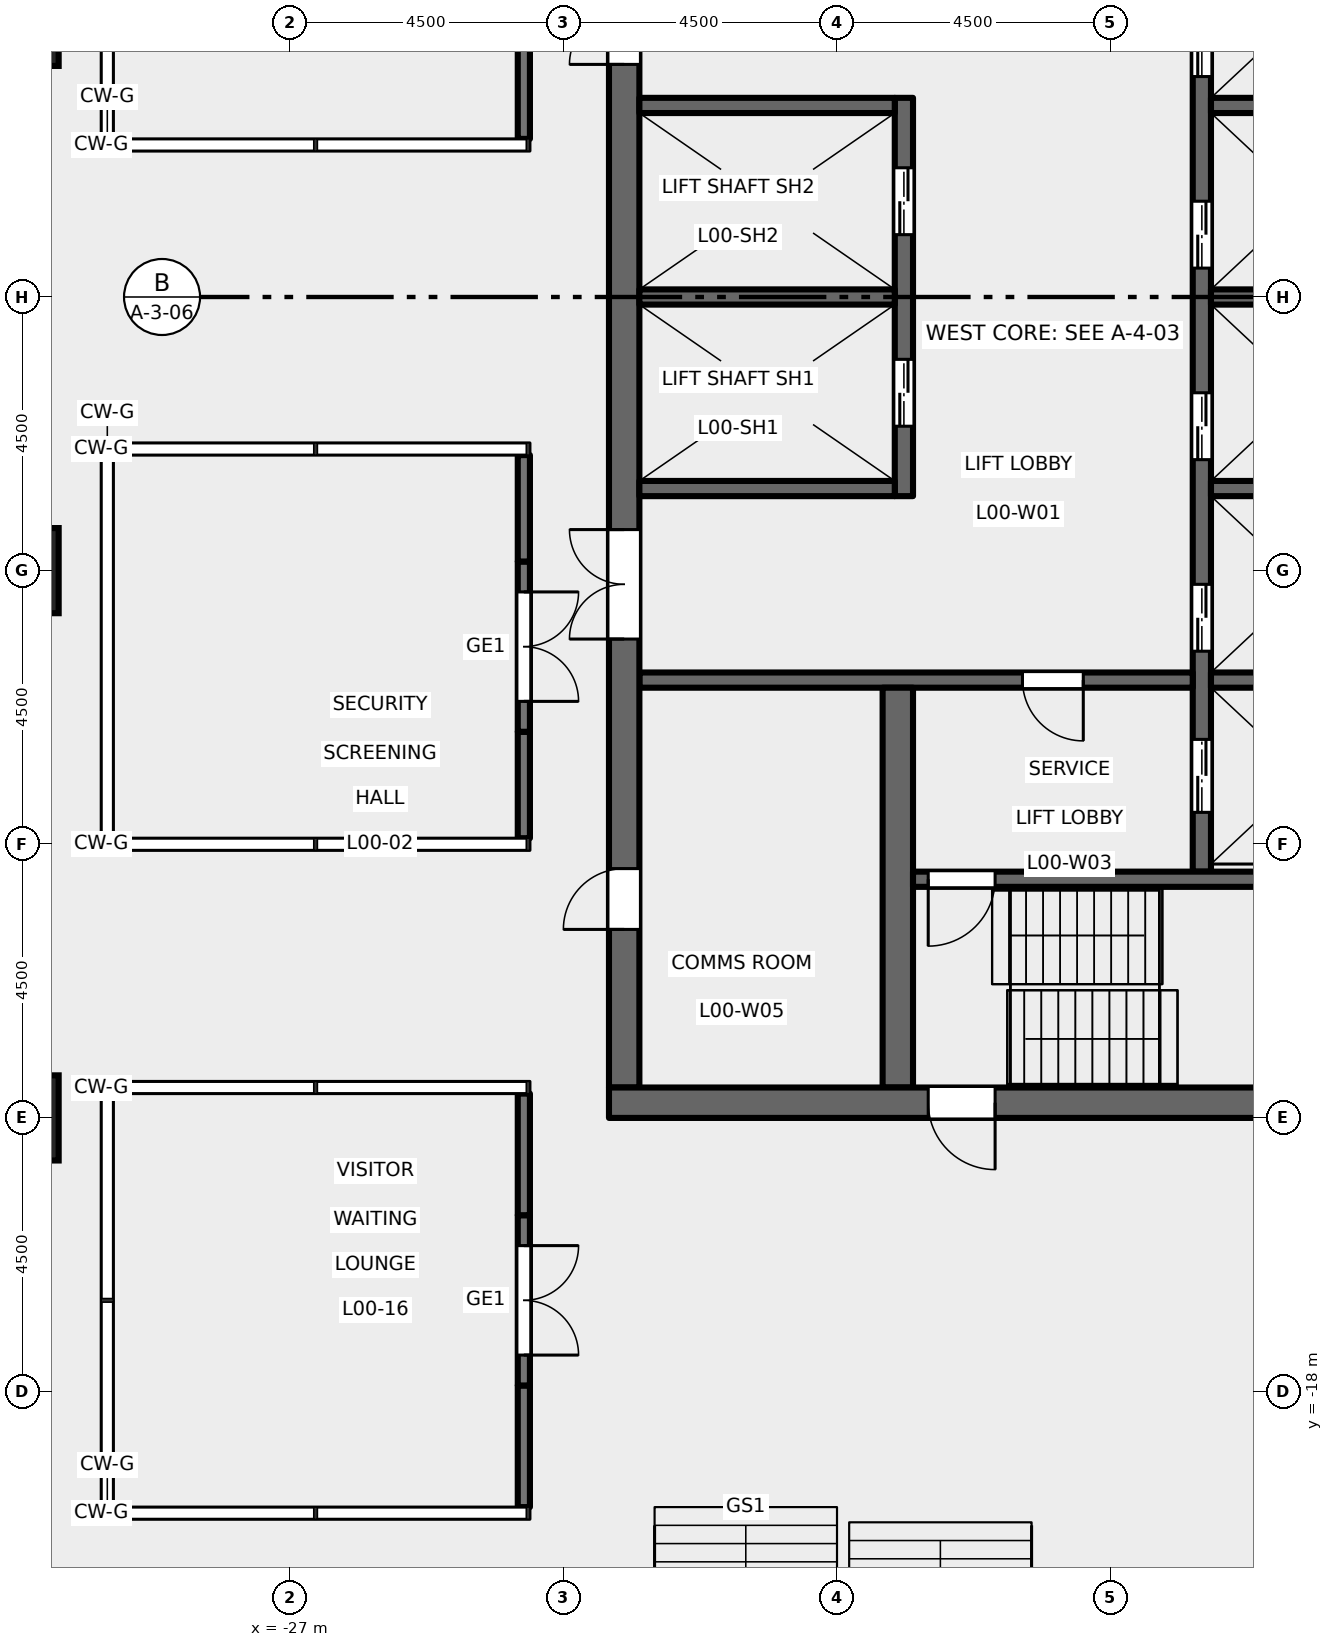
"""IFC4 building model, lengths in metres.
Left out: names, types, materials, properties, quantities, classifications, styles, units other than length and angle.
Written with IfcOpenShell. Run it as: python <this file> out.ifc"""

import sys

from ifc_helpers import new_model, si_unit, direction, frame, frame_2d, origin, origin_2d, place, context, subcontext, project, spatial, rectangle, hollow_rectangle, extrude, element, fill, save


model = new_model("IFC4")
c1 = context("Model", 3, precision=1e-05, world=origin(), true_north=direction((0.0, 1.0)))
c2 = subcontext(c1, "Body", "Model", "MODEL_VIEW")
j1 = project(units=[si_unit("LENGTHUNIT", "METRE"), si_unit("PLANEANGLEUNIT", "RADIAN")], contexts=[c1])
p1 = place(None, origin())
s1 = spatial("IfcSite", under=j1, at=p1, CompositionType="ELEMENT")
p2 = place(p1, origin())
s2 = spatial("IfcBuilding", under=s1, at=p2, CompositionType="ELEMENT")
p3 = place(p2, origin())
s3 = spatial("IfcBuildingStorey", under=s2, at=p3, CompositionType="ELEMENT", Elevation=0.0)
for number, where, z_axis, x_axis in (
    (1, (-31.5, 4.5, 0.0), (0.0, 0.0, 1.0), (1.0, 0.0, 0.0)),
    (2, (-31.5, -4.5, 0.0), (0.0, 0.0, 1.0), (1.0, 0.0, 0.0)),
    (3, (-31.5, -13.5, 0.0), (0.0, 0.0, 1.0), (1.0, 0.0, 0.0)),
):
    element("IfcColumn", number, at=place(p3, frame(where, z_axis=z_axis, x_axis=x_axis)), inside=s3, PredefinedType="COLUMN", context=c2, shape_type="SweptSolid", body=[
        extrude(hollow_rectangle(XDim=1.4, YDim=1.4, WallThickness=0.07, at=origin_2d()), origin(), (0.0, 0.0, 1.0), 7.2),
    ])
p4 = place(p3, frame((-12.0, -9.45, 0.0), z_axis=(0.0, 0.0, 1.0), x_axis=(0.0, 1.0, 0.0)))
e4 = element("IfcWall", 4, at=p4, inside=s3, PredefinedType="SHEAR", context=c2, shape_type="SweptSolid", body=[
    extrude(rectangle(XDim=18.9, YDim=0.3, at=frame_2d((9.45, 0.0))), origin(), (0.0, 0.0, 1.0), 7.0),
])
p5 = place(p4, frame((3.625, 0.0, 0.0)))
e5 = element("IfcOpeningElement", 5, at=p5, cuts=e4, PredefinedType="OPENING", context=c2, shape_type="SweptSolid", body=[
    extrude(rectangle(XDim=1.1, YDim=2.1, at=frame_2d((0.55, 1.05))), frame((0.0, 0.16, 0.0), z_axis=(0.0, -1.0, 0.0), x_axis=(1.0, 0.0, 0.0)), (0.0, 0.0, 1.0), 0.32),
])
p6 = place(p4, frame((6.775, 0.0, 0.0)))
e6 = element("IfcOpeningElement", 6, at=p6, cuts=e4, PredefinedType="OPENING", context=c2, shape_type="SweptSolid", body=[
    extrude(rectangle(XDim=1.1, YDim=2.1, at=frame_2d((0.55, 1.05))), frame((0.0, 0.16, 0.0), z_axis=(0.0, -1.0, 0.0), x_axis=(1.0, 0.0, 0.0)), (0.0, 0.0, 1.0), 0.32),
])
p7 = place(p4, frame((9.925, 0.0, 0.0)))
e7 = element("IfcOpeningElement", 7, at=p7, cuts=e4, PredefinedType="OPENING", context=c2, shape_type="SweptSolid", body=[
    extrude(rectangle(XDim=1.1, YDim=2.1, at=frame_2d((0.55, 1.05))), frame((0.0, 0.16, 0.0), z_axis=(0.0, -1.0, 0.0), x_axis=(1.0, 0.0, 0.0)), (0.0, 0.0, 1.0), 0.32),
])
p8 = place(p4, frame((13.075, 0.0, 0.0)))
e8 = element("IfcOpeningElement", 8, at=p8, cuts=e4, PredefinedType="OPENING", context=c2, shape_type="SweptSolid", body=[
    extrude(rectangle(XDim=1.1, YDim=2.1, at=frame_2d((0.55, 1.05))), frame((0.0, 0.16, 0.0), z_axis=(0.0, -1.0, 0.0), x_axis=(1.0, 0.0, 0.0)), (0.0, 0.0, 1.0), 0.32),
])
p9 = place(p4, frame((16.725, 0.0, 0.0)))
e9 = element("IfcOpeningElement", 9, at=p9, cuts=e4, PredefinedType="OPENING", context=c2, shape_type="SweptSolid", body=[
    extrude(rectangle(XDim=1.2, YDim=2.1, at=frame_2d((0.6, 1.05))), frame((0.0, 0.16, 0.0), z_axis=(0.0, -1.0, 0.0), x_axis=(1.0, 0.0, 0.0)), (0.0, 0.0, 1.0), 0.32),
])
p10 = place(p4, frame((0.975, 0.0, 0.0)))
e10 = element("IfcOpeningElement", 10, at=p10, cuts=e4, PredefinedType="OPENING", context=c2, shape_type="SweptSolid", body=[
    extrude(rectangle(XDim=1.2, YDim=2.1, at=frame_2d((0.6, 1.05))), frame((0.0, 0.16, 0.0), z_axis=(0.0, -1.0, 0.0), x_axis=(1.0, 0.0, 0.0)), (0.0, 0.0, 1.0), 0.32),
])
p11 = place(p3, frame((-12.15, -6.3, 0.0), z_axis=(0.0, 0.0, 1.0), x_axis=(-1.0, 0.0, 0.0)))
e11 = element("IfcWall", 11, at=p11, inside=s3, PredefinedType="SHEAR", context=c2, shape_type="SweptSolid", body=[
    extrude(rectangle(XDim=9.1, YDim=0.25, at=frame_2d((4.55, 0.0))), origin(), (0.0, 0.0, 1.0), 7.0),
])
p12 = place(p11, frame((1.8, 0.0, 0.0)))
e12 = element("IfcOpeningElement", 12, at=p12, cuts=e11, PredefinedType="OPENING", context=c2, shape_type="SweptSolid", body=[
    extrude(rectangle(XDim=1.0, YDim=2.1, at=frame_2d((0.5, 1.05))), frame((0.0, 0.135, 0.0), z_axis=(0.0, -1.0, 0.0), x_axis=(1.0, 0.0, 0.0)), (0.0, 0.0, 1.0), 0.27),
])
p13 = place(p3, frame((-21.5, -13.0, 0.0), z_axis=(0.0, 0.0, 1.0), x_axis=(0.0, 1.0, 0.0)))
e13 = element("IfcWall", 13, at=p13, inside=s3, PredefinedType="SHEAR", context=c2, shape_type="SweptSolid", body=[
    extrude(rectangle(XDim=26.0, YDim=0.5, at=frame_2d((13.0, 0.0))), origin(), (0.0, 0.0, 1.0), 7.0),
])
p14 = place(p13, frame((16.825, 0.0, 0.0)))
e14 = element("IfcOpeningElement", 14, at=p14, cuts=e13, PredefinedType="OPENING", context=c2, shape_type="SweptSolid", body=[
    extrude(rectangle(XDim=1.8, YDim=2.1, at=frame_2d((0.9, 1.05))), frame((0.0, 0.26, 0.0), z_axis=(0.0, -1.0, 0.0), x_axis=(1.0, 0.0, 0.0)), (0.0, 0.0, 1.0), 0.52),
])
p15 = place(p13, frame((7.375, 0.0, 0.0)))
e15 = element("IfcOpeningElement", 15, at=p15, cuts=e13, PredefinedType="OPENING", context=c2, shape_type="SweptSolid", body=[
    extrude(rectangle(XDim=1.8, YDim=2.1, at=frame_2d((0.9, 1.05))), frame((0.0, 0.26, 0.0), z_axis=(0.0, -1.0, 0.0), x_axis=(1.0, 0.0, 0.0)), (0.0, 0.0, 1.0), 0.52),
])
p16 = place(p13, frame((2.6, 0.0, 0.0)))
e16 = element("IfcOpeningElement", 16, at=p16, cuts=e13, PredefinedType="OPENING", context=c2, shape_type="SweptSolid", body=[
    extrude(rectangle(XDim=1.0, YDim=2.1, at=frame_2d((0.5, 1.05))), frame((0.0, 0.26, 0.0), z_axis=(0.0, -1.0, 0.0), x_axis=(1.0, 0.0, 0.0)), (0.0, 0.0, 1.0), 0.52),
])
p17 = place(p3, frame((-16.9, -3.275, 0.0), z_axis=(0.0, 0.0, 1.0), x_axis=(0.0, 1.0, 0.0)))
e17 = element("IfcWall", 17, at=p17, inside=s3, PredefinedType="SHEAR", context=c2, shape_type="SweptSolid", body=[
    extrude(rectangle(XDim=6.55, YDim=0.3, at=frame_2d((3.275, 0.0))), origin(), (0.0, 0.0, 1.0), 7.0),
])
p18 = place(p17, frame((1.15, 0.0, 0.0)))
e18 = element("IfcOpeningElement", 18, at=p18, cuts=e17, PredefinedType="OPENING", context=c2, shape_type="SweptSolid", body=[
    extrude(rectangle(XDim=1.1, YDim=2.1, at=frame_2d((0.55, 1.05))), frame((0.0, 0.16, 0.0), z_axis=(0.0, -1.0, 0.0), x_axis=(1.0, 0.0, 0.0)), (0.0, 0.0, 1.0), 0.32),
])
p19 = place(p17, frame((4.3, 0.0, 0.0)))
e19 = element("IfcOpeningElement", 19, at=p19, cuts=e17, PredefinedType="OPENING", context=c2, shape_type="SweptSolid", body=[
    extrude(rectangle(XDim=1.1, YDim=2.1, at=frame_2d((0.55, 1.05))), frame((0.0, 0.16, 0.0), z_axis=(0.0, -1.0, 0.0), x_axis=(1.0, 0.0, 0.0)), (0.0, 0.0, 1.0), 0.32),
])
for number, where, z_axis, x_axis in (
    (20, (-17.05, 0.0, 0.0), (0.0, 0.0, 1.0), (-1.0, 0.0, 0.0)),
    (21, (-17.05, 3.15, 0.0), (0.0, 0.0, 1.0), (-1.0, 0.0, 0.0)),
    (22, (-17.05, -3.15, 0.0), (0.0, 0.0, 1.0), (-1.0, 0.0, 0.0)),
):
    element("IfcWall", number, at=place(p3, frame(where, z_axis=z_axis, x_axis=x_axis)), inside=s3, PredefinedType="SHEAR", context=c2, shape_type="SweptSolid", body=[
        extrude(rectangle(XDim=4.2, YDim=0.25, at=frame_2d((2.1, 0.0))), origin(), (0.0, 0.0, 1.0), 7.0),
    ])
p20 = place(p3, frame((-17.0, -13.0, 0.0), z_axis=(0.0, 0.0, 1.0), x_axis=(0.0, 1.0, 0.0)))
e23 = element("IfcWall", 23, at=p20, inside=s3, PredefinedType="SHEAR", context=c2, shape_type="SweptSolid", body=[
    extrude(rectangle(XDim=6.575, YDim=0.5, at=frame_2d((3.288, 0.0))), origin(), (0.0, 0.0, 1.0), 7.0),
])
for number, where, z_axis, x_axis in (
    (24, (-8.75, 0.0, 0.0), (0.0, 0.0, 1.0), (-1.0, 0.0, 0.0)),
    (25, (-8.75, 3.15, 0.0), (0.0, 0.0, 1.0), (-1.0, 0.0, 0.0)),
    (26, (-8.75, -3.15, 0.0), (0.0, 0.0, 1.0), (-1.0, 0.0, 0.0)),
    (27, (-8.75, -6.3, 0.0), (0.0, 0.0, 1.0), (-1.0, 0.0, 0.0)),
):
    element("IfcWall", number, at=place(p3, frame(where, z_axis=z_axis, x_axis=x_axis)), inside=s3, PredefinedType="SHEAR", context=c2, shape_type="SweptSolid", body=[
        extrude(rectangle(XDim=3.1, YDim=0.25, at=frame_2d((1.55, 0.0))), origin(), (0.0, 0.0, 1.0), 7.0),
    ])
p21 = place(p3, frame((-8.75, -9.575, 0.0), z_axis=(0.0, 0.0, 1.0), x_axis=(-1.0, 0.0, 0.0)))
e28 = element("IfcWall", 28, at=p21, inside=s3, PredefinedType="SHEAR", context=c2, shape_type="SweptSolid", body=[
    extrude(rectangle(XDim=8.0, YDim=0.25, at=frame_2d((4.0, 0.0))), origin(), (0.0, 0.0, 1.0), 7.0),
])
p22 = place(p21, frame((6.65, 0.0, 0.0)))
e29 = element("IfcOpeningElement", 29, at=p22, cuts=e28, PredefinedType="OPENING", context=c2, shape_type="SweptSolid", body=[
    extrude(rectangle(XDim=1.1, YDim=2.1, at=frame_2d((0.55, 1.05))), frame((0.0, 0.135, 0.0), z_axis=(0.0, -1.0, 0.0), x_axis=(1.0, 0.0, 0.0)), (0.0, 0.0, 1.0), 0.27),
])
p23 = place(p3, frame((-8.25, -13.25, 0.0), z_axis=(0.0, 0.0, 1.0), x_axis=(-1.0, 0.0, 0.0)))
e30 = element("IfcWall", 30, at=p23, inside=s3, PredefinedType="SHEAR", context=c2, shape_type="SweptSolid", body=[
    extrude(rectangle(XDim=13.5, YDim=0.5, at=frame_2d((6.75, 0.0))), origin(), (0.0, 0.0, 1.0), 7.0),
])
p24 = place(p23, frame((7.15, 0.0, 0.0)))
e31 = element("IfcOpeningElement", 31, at=p24, cuts=e30, PredefinedType="OPENING", context=c2, shape_type="SweptSolid", body=[
    extrude(rectangle(XDim=1.1, YDim=2.1, at=frame_2d((0.55, 1.05))), frame((0.0, 0.26, 0.0), z_axis=(0.0, -1.0, 0.0), x_axis=(1.0, 0.0, 0.0)), (0.0, 0.0, 1.0), 0.52),
])
p25 = place(p3, frame((-23.15, -8.9, 0.0), z_axis=(0.0, 0.0, 1.0), x_axis=(0.0, 1.0, 0.0)))
e32 = element("IfcWall", 32, at=p25, inside=s3, PredefinedType="SOLIDWALL", context=c2, shape_type="SweptSolid", body=[
    extrude(rectangle(XDim=1.75, YDim=0.2, at=frame_2d((0.875, 0.0))), origin(), (0.0, 0.0, 1.0), 4.3),
])
p26 = place(p3, frame((-23.15, -7.15, 0.0), z_axis=(0.0, 0.0, 1.0), x_axis=(0.0, 1.0, 0.0)))
e33 = element("IfcWall", 33, at=p26, inside=s3, PredefinedType="SOLIDWALL", context=c2, shape_type="SweptSolid", body=[
    extrude(rectangle(XDim=2.8, YDim=0.2, at=frame_2d((1.4, 0.0))), origin(), (0.0, 0.0, 1.0), 4.3),
])
p27 = place(p26, frame((0.5, 0.0, 0.0)))
e34 = element("IfcOpeningElement", 34, at=p27, cuts=e33, PredefinedType="OPENING", context=c2, shape_type="SweptSolid", body=[
    extrude(rectangle(XDim=1.8, YDim=2.4, at=frame_2d((0.9, 1.2))), frame((0.0, 0.11, 0.0), z_axis=(0.0, -1.0, 0.0), x_axis=(1.0, 0.0, 0.0)), (0.0, 0.0, 1.0), 0.22),
])
p28 = place(p3, frame((-23.15, -4.35, 0.0), z_axis=(0.0, 0.0, 1.0), x_axis=(0.0, 1.0, 0.0)))
e35 = element("IfcWall", 35, at=p28, inside=s3, PredefinedType="SOLIDWALL", context=c2, shape_type="SweptSolid", body=[
    extrude(rectangle(XDim=1.75, YDim=0.2, at=frame_2d((0.875, 0.0))), origin(), (0.0, 0.0, 1.0), 4.3),
])
p29 = place(p3, frame((-23.15, 2.6, 0.0), z_axis=(0.0, 0.0, 1.0), x_axis=(0.0, 1.0, 0.0)))
e36 = element("IfcWall", 36, at=p29, inside=s3, PredefinedType="SOLIDWALL", context=c2, shape_type="SweptSolid", body=[
    extrude(rectangle(XDim=2.15, YDim=0.2, at=frame_2d((1.075, 0.0))), origin(), (0.0, 0.0, 1.0), 4.3),
])
p30 = place(p3, frame((-23.15, -19.9, 0.0), z_axis=(0.0, 0.0, 1.0), x_axis=(0.0, 1.0, 0.0)))
e37 = element("IfcWall", 37, at=p30, inside=s3, PredefinedType="SOLIDWALL", context=c2, shape_type="SweptSolid", body=[
    extrude(rectangle(XDim=2.0, YDim=0.2, at=frame_2d((1.0, 0.0))), origin(), (0.0, 0.0, 1.0), 4.3),
])
p31 = place(p3, frame((-23.15, -17.9, 0.0), z_axis=(0.0, 0.0, 1.0), x_axis=(0.0, 1.0, 0.0)))
e38 = element("IfcWall", 38, at=p31, inside=s3, PredefinedType="SOLIDWALL", context=c2, shape_type="SweptSolid", body=[
    extrude(rectangle(XDim=2.8, YDim=0.2, at=frame_2d((1.4, 0.0))), origin(), (0.0, 0.0, 1.0), 4.3),
])
p32 = place(p31, frame((0.5, 0.0, 0.0)))
e39 = element("IfcOpeningElement", 39, at=p32, cuts=e38, PredefinedType="OPENING", context=c2, shape_type="SweptSolid", body=[
    extrude(rectangle(XDim=1.8, YDim=2.4, at=frame_2d((0.9, 1.2))), frame((0.0, 0.11, 0.0), z_axis=(0.0, -1.0, 0.0), x_axis=(1.0, 0.0, 0.0)), (0.0, 0.0, 1.0), 0.22),
])
p33 = place(p3, frame((-23.15, -15.1, 0.0), z_axis=(0.0, 0.0, 1.0), x_axis=(0.0, 1.0, 0.0)))
e40 = element("IfcWall", 40, at=p33, inside=s3, PredefinedType="SOLIDWALL", context=c2, shape_type="SweptSolid", body=[
    extrude(rectangle(XDim=2.0, YDim=0.2, at=frame_2d((1.0, 0.0))), origin(), (0.0, 0.0, 1.0), 4.3),
])
p34 = place(p12, origin())
e41 = element("IfcDoor", 41, at=p34, inside=s3, OperationType="SINGLE_SWING_RIGHT", PredefinedType="DOOR", context=c2, shape_type="SweptSolid", body=[
    extrude(rectangle(XDim=1.0, YDim=2.1, at=frame_2d((0.5, 1.05))), frame((0.0, 0.025, 0.0), z_axis=(0.0, -1.0, 0.0), x_axis=(1.0, 0.0, 0.0)), (0.0, 0.0, 1.0), 0.05),
])
fill(e12, e41)
p35 = place(p22, origin())
e42 = element("IfcDoor", 42, at=p35, inside=s3, OperationType="SINGLE_SWING_LEFT", PredefinedType="DOOR", context=c2, shape_type="SweptSolid", body=[
    extrude(rectangle(XDim=1.1, YDim=2.1, at=frame_2d((0.55, 1.05))), frame((0.0, 0.025, 0.0), z_axis=(0.0, -1.0, 0.0), x_axis=(1.0, 0.0, 0.0)), (0.0, 0.0, 1.0), 0.05),
])
fill(e29, e42)
p36 = place(p14, origin())
e43 = element("IfcDoor", 43, at=p36, inside=s3, OperationType="DOUBLE_DOOR_DOUBLE_SWING", PredefinedType="DOOR", context=c2, shape_type="SweptSolid", body=[
    extrude(rectangle(XDim=1.8, YDim=2.1, at=frame_2d((0.9, 1.05))), frame((0.0, 0.025, 0.0), z_axis=(0.0, -1.0, 0.0), x_axis=(1.0, 0.0, 0.0)), (0.0, 0.0, 1.0), 0.05),
])
fill(e14, e43)
p37 = place(p15, origin())
e44 = element("IfcDoor", 44, at=p37, inside=s3, OperationType="DOUBLE_DOOR_DOUBLE_SWING", PredefinedType="DOOR", context=c2, shape_type="SweptSolid", body=[
    extrude(rectangle(XDim=1.8, YDim=2.1, at=frame_2d((0.9, 1.05))), frame((0.0, 0.025, 0.0), z_axis=(0.0, -1.0, 0.0), x_axis=(1.0, 0.0, 0.0)), (0.0, 0.0, 1.0), 0.05),
])
fill(e15, e44)
p38 = place(p24, origin())
e45 = element("IfcDoor", 45, at=p38, inside=s3, OperationType="SINGLE_SWING_RIGHT", PredefinedType="DOOR", context=c2, shape_type="SweptSolid", body=[
    extrude(rectangle(XDim=1.1, YDim=2.1, at=frame_2d((0.55, 1.05))), frame((0.0, 0.025, 0.0), z_axis=(0.0, -1.0, 0.0), x_axis=(1.0, 0.0, 0.0)), (0.0, 0.0, 1.0), 0.05),
])
fill(e31, e45)
p39 = place(p5, origin())
e46 = element("IfcDoor", 46, at=p39, inside=s3, OperationType="DOUBLE_DOOR_SLIDING", PredefinedType="DOOR", context=c2, shape_type="SweptSolid", body=[
    extrude(rectangle(XDim=1.1, YDim=2.1, at=frame_2d((0.55, 1.05))), frame((0.0, 0.025, 0.0), z_axis=(0.0, -1.0, 0.0), x_axis=(1.0, 0.0, 0.0)), (0.0, 0.0, 1.0), 0.05),
])
fill(e5, e46)
p40 = place(p6, origin())
e47 = element("IfcDoor", 47, at=p40, inside=s3, OperationType="DOUBLE_DOOR_SLIDING", PredefinedType="DOOR", context=c2, shape_type="SweptSolid", body=[
    extrude(rectangle(XDim=1.1, YDim=2.1, at=frame_2d((0.55, 1.05))), frame((0.0, 0.025, 0.0), z_axis=(0.0, -1.0, 0.0), x_axis=(1.0, 0.0, 0.0)), (0.0, 0.0, 1.0), 0.05),
])
fill(e6, e47)
p41 = place(p7, origin())
e48 = element("IfcDoor", 48, at=p41, inside=s3, OperationType="DOUBLE_DOOR_SLIDING", PredefinedType="DOOR", context=c2, shape_type="SweptSolid", body=[
    extrude(rectangle(XDim=1.1, YDim=2.1, at=frame_2d((0.55, 1.05))), frame((0.0, 0.025, 0.0), z_axis=(0.0, -1.0, 0.0), x_axis=(1.0, 0.0, 0.0)), (0.0, 0.0, 1.0), 0.05),
])
fill(e7, e48)
p42 = place(p8, origin())
e49 = element("IfcDoor", 49, at=p42, inside=s3, OperationType="DOUBLE_DOOR_SLIDING", PredefinedType="DOOR", context=c2, shape_type="SweptSolid", body=[
    extrude(rectangle(XDim=1.1, YDim=2.1, at=frame_2d((0.55, 1.05))), frame((0.0, 0.025, 0.0), z_axis=(0.0, -1.0, 0.0), x_axis=(1.0, 0.0, 0.0)), (0.0, 0.0, 1.0), 0.05),
])
fill(e8, e49)
p43 = place(p18, origin())
e50 = element("IfcDoor", 50, at=p43, inside=s3, OperationType="DOUBLE_DOOR_SLIDING", PredefinedType="DOOR", context=c2, shape_type="SweptSolid", body=[
    extrude(rectangle(XDim=1.1, YDim=2.1, at=frame_2d((0.55, 1.05))), frame((0.0, 0.025, 0.0), z_axis=(0.0, -1.0, 0.0), x_axis=(1.0, 0.0, 0.0)), (0.0, 0.0, 1.0), 0.05),
])
fill(e18, e50)
p44 = place(p19, origin())
e51 = element("IfcDoor", 51, at=p44, inside=s3, OperationType="DOUBLE_DOOR_SLIDING", PredefinedType="DOOR", context=c2, shape_type="SweptSolid", body=[
    extrude(rectangle(XDim=1.1, YDim=2.1, at=frame_2d((0.55, 1.05))), frame((0.0, 0.025, 0.0), z_axis=(0.0, -1.0, 0.0), x_axis=(1.0, 0.0, 0.0)), (0.0, 0.0, 1.0), 0.05),
])
fill(e19, e51)
p45 = place(p10, origin())
e52 = element("IfcDoor", 52, at=p45, inside=s3, OperationType="DOUBLE_DOOR_SLIDING", PredefinedType="DOOR", context=c2, shape_type="SweptSolid", body=[
    extrude(rectangle(XDim=1.2, YDim=2.1, at=frame_2d((0.6, 1.05))), frame((0.0, 0.025, 0.0), z_axis=(0.0, -1.0, 0.0), x_axis=(1.0, 0.0, 0.0)), (0.0, 0.0, 1.0), 0.05),
])
fill(e10, e52)
p46 = place(p16, origin())
e53 = element("IfcDoor", 53, at=p46, inside=s3, OperationType="SINGLE_SWING_RIGHT", PredefinedType="DOOR", context=c2, shape_type="SweptSolid", body=[
    extrude(rectangle(XDim=1.0, YDim=2.1, at=frame_2d((0.5, 1.05))), frame((0.0, 0.025, 0.0), z_axis=(0.0, -1.0, 0.0), x_axis=(1.0, 0.0, 0.0)), (0.0, 0.0, 1.0), 0.05),
])
fill(e16, e53)
p47 = place(p27, frame((1.8, 0.0, 0.0), z_axis=(0.0, 0.0, 1.0), x_axis=(-1.0, 0.0, 0.0)))
e54 = element("IfcDoor", 54, at=p47, inside=s3, OperationType="DOUBLE_DOOR_SINGLE_SWING", PredefinedType="DOOR", context=c2, shape_type="SweptSolid", body=[
    extrude(rectangle(XDim=1.8, YDim=2.4, at=frame_2d((0.9, 1.2))), frame((0.0, 0.025, 0.0), z_axis=(0.0, -1.0, 0.0), x_axis=(1.0, 0.0, 0.0)), (0.0, 0.0, 1.0), 0.05),
])
fill(e34, e54)
p48 = place(p32, frame((1.8, 0.0, 0.0), z_axis=(0.0, 0.0, 1.0), x_axis=(-1.0, 0.0, 0.0)))
e55 = element("IfcDoor", 55, at=p48, inside=s3, OperationType="DOUBLE_DOOR_SINGLE_SWING", PredefinedType="DOOR", context=c2, shape_type="SweptSolid", body=[
    extrude(rectangle(XDim=1.8, YDim=2.4, at=frame_2d((0.9, 1.2))), frame((0.0, 0.025, 0.0), z_axis=(0.0, -1.0, 0.0), x_axis=(1.0, 0.0, 0.0)), (0.0, 0.0, 1.0), 0.05),
])
fill(e39, e55)
save(model, sys.argv[1])
